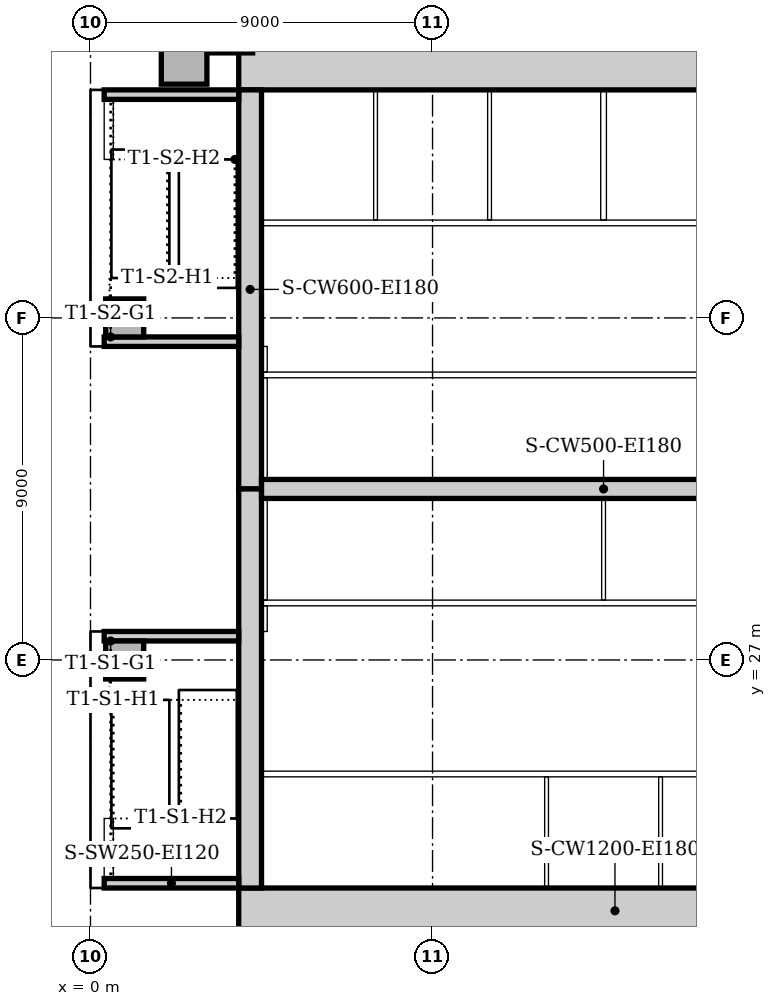
"""IFC4 building model, lengths in metres.
Left out: names, types, materials, properties, quantities, classifications, styles, units other than length and angle.
Written with IfcOpenShell. Run it as: python <this file> out.ifc"""

import sys

from ifc_helpers import new_model, si_unit, direction, frame, frame_2d, origin, origin_2d, place, context, subcontext, project, spatial, rectangle, extrude, element, fill, save


model = new_model("IFC4")
c1 = context("Model", 3, precision=1e-05, world=origin(), true_north=direction((0.0, 1.0)))
c2 = subcontext(c1, "Body", "Model", "MODEL_VIEW")
j1 = project(units=[si_unit("LENGTHUNIT", "METRE"), si_unit("PLANEANGLEUNIT", "RADIAN")], contexts=[c1])
p1 = place(None, origin())
s1 = spatial("IfcSite", under=j1, at=p1, CompositionType="ELEMENT")
p2 = place(p1, origin())
s2 = spatial("IfcBuilding", under=s1, at=p2, CompositionType="ELEMENT")
p3 = place(p2, frame((0.0, 0.0, -9.5)))
s3 = spatial("IfcBuildingStorey", under=s2, at=p3, CompositionType="ELEMENT", Elevation=-9.5)
for number, where, z_axis, x_axis in (
    (1, (3.9, 20.4, 0.0), (0.0, 0.0, 1.0), (1.0, 0.0, 0.0)),
    (2, (23.7, 42.6, 0.0), (0.0, 0.0, 1.0), (-1.0, 0.0, 0.0)),
):
    element("IfcWall", number, at=place(p3, frame(where, z_axis=z_axis, x_axis=x_axis)), inside=s3, PredefinedType="SOLIDWALL", context=c2, shape_type="SweptSolid", body=[
        extrude(rectangle(XDim=19.8, YDim=1.2, at=frame_2d((9.9, 0.0))), origin(), (0.0, 0.0, 1.0), 4.5),
    ])
p4 = place(p3, frame((4.2, 42.0, 0.0), z_axis=(0.0, 0.0, 1.0), x_axis=(0.0, -1.0, 0.0)))
e3 = element("IfcWall", 3, at=p4, inside=s3, PredefinedType="SOLIDWALL", context=c2, shape_type="SweptSolid", body=[
    extrude(rectangle(XDim=10.5, YDim=0.6, at=frame_2d((5.25, 0.0))), origin(), (0.0, 0.0, 1.0), 4.5),
])
p5 = place(p4, frame((5.3, 0.0, 0.0)))
e4 = element("IfcOpeningElement", 4, at=p5, cuts=e3, PredefinedType="OPENING", context=c2, shape_type="SweptSolid", body=[
    extrude(rectangle(XDim=1.0, YDim=2.1, at=frame_2d((0.5, 1.05))), frame((0.0, 0.31, 0.0), z_axis=(0.0, -1.0, 0.0), x_axis=(1.0, 0.0, 0.0)), (0.0, 0.0, 1.0), 0.62),
])
p6 = place(p3, frame((4.2, 31.5, 0.0), z_axis=(0.0, 0.0, 1.0), x_axis=(0.0, -1.0, 0.0)))
e5 = element("IfcWall", 5, at=p6, inside=s3, PredefinedType="SOLIDWALL", context=c2, shape_type="SweptSolid", body=[
    extrude(rectangle(XDim=10.5, YDim=0.6, at=frame_2d((5.25, 0.0))), origin(), (0.0, 0.0, 1.0), 4.5),
])
p7 = place(p6, frame((4.25, 0.0, 0.0)))
e6 = element("IfcOpeningElement", 6, at=p7, cuts=e5, PredefinedType="OPENING", context=c2, shape_type="SweptSolid", body=[
    extrude(rectangle(XDim=1.0, YDim=2.1, at=frame_2d((0.5, 1.05))), frame((0.0, 0.31, 0.0), z_axis=(0.0, -1.0, 0.0), x_axis=(1.0, 0.0, 0.0)), (0.0, 0.0, 1.0), 0.62),
])
p8 = place(p3, frame((4.5, 31.5, 0.0), z_axis=(0.0, 0.0, 1.0), x_axis=(1.0, 0.0, 0.0)))
e7 = element("IfcWall", 7, at=p8, inside=s3, PredefinedType="SOLIDWALL", context=c2, shape_type="SweptSolid", body=[
    extrude(rectangle(XDim=18.0, YDim=0.5, at=frame_2d((9.0, 0.0))), origin(), (0.0, 0.0, 1.0), 4.5),
])
p9 = place(p3, frame((0.36, 21.125, 0.0), z_axis=(0.0, 0.0, 1.0), x_axis=(1.0, 0.0, 0.0)))
e8 = element("IfcWall", 8, at=p9, inside=s3, PredefinedType="SOLIDWALL", context=c2, shape_type="SweptSolid", body=[
    extrude(rectangle(XDim=3.54, YDim=0.25, at=frame_2d((1.77, 0.0))), origin(), (0.0, 0.0, 1.0), 4.5),
])
p10 = place(p3, frame((3.9, 27.625, 0.0), z_axis=(0.0, 0.0, 1.0), x_axis=(-1.0, 0.0, 0.0)))
e9 = element("IfcWall", 9, at=p10, inside=s3, PredefinedType="SOLIDWALL", context=c2, shape_type="SweptSolid", body=[
    extrude(rectangle(XDim=3.54, YDim=0.25, at=frame_2d((1.77, 0.0))), origin(), (0.0, 0.0, 1.0), 4.5),
])
p11 = place(p10, frame((0.4, 0.0, 0.0)))
e10 = element("IfcOpeningElement", 10, at=p11, cuts=e9, PredefinedType="OPENING", context=c2, shape_type="SweptSolid", body=[
    extrude(rectangle(XDim=1.0, YDim=2.1, at=frame_2d((0.5, 1.05))), frame((0.0, 0.135, 0.0), z_axis=(0.0, -1.0, 0.0), x_axis=(1.0, 0.0, 0.0)), (0.0, 0.0, 1.0), 0.27),
])
p12 = place(p3, frame((0.36, 35.375, 0.0), z_axis=(0.0, 0.0, 1.0), x_axis=(1.0, 0.0, 0.0)))
e11 = element("IfcWall", 11, at=p12, inside=s3, PredefinedType="SOLIDWALL", context=c2, shape_type="SweptSolid", body=[
    extrude(rectangle(XDim=3.54, YDim=0.25, at=frame_2d((1.77, 0.0))), origin(), (0.0, 0.0, 1.0), 4.5),
])
p13 = place(p12, frame((2.14, 0.0, 0.0)))
e12 = element("IfcOpeningElement", 12, at=p13, cuts=e11, PredefinedType="OPENING", context=c2, shape_type="SweptSolid", body=[
    extrude(rectangle(XDim=1.0, YDim=2.1, at=frame_2d((0.5, 1.05))), frame((0.0, 0.135, 0.0), z_axis=(0.0, -1.0, 0.0), x_axis=(1.0, 0.0, 0.0)), (0.0, 0.0, 1.0), 0.27),
])
p14 = place(p3, frame((3.9, 41.875, 0.0), z_axis=(0.0, 0.0, 1.0), x_axis=(-1.0, 0.0, 0.0)))
e13 = element("IfcWall", 13, at=p14, inside=s3, PredefinedType="SOLIDWALL", context=c2, shape_type="SweptSolid", body=[
    extrude(rectangle(XDim=3.54, YDim=0.25, at=frame_2d((1.77, 0.0))), origin(), (0.0, 0.0, 1.0), 4.5),
])
for number, where, z_axis, x_axis in (
    (14, (3.667, 43.574, 0.0), (0.0, 0.0, 1.0), (1.0, 0.0, 0.0)),
    (15, (2.463, 42.75, 0.0), (0.0, 0.0, 1.0), (1.0, 0.0, 0.0)),
):
    element("IfcColumn", number, at=place(p3, frame(where, z_axis=z_axis, x_axis=x_axis)), inside=s3, PredefinedType="COLUMN", context=c2, shape_type="SweptSolid", body=[
        extrude(rectangle(XDim=1.2, YDim=1.2, at=origin_2d()), origin(), (0.0, 0.0, 1.0), 4.15),
    ])
for number, where, z_axis, x_axis in (
    (16, (0.9, 27.0, 0.0), (0.0, 0.0, 1.0), (1.0, 0.0, 0.0)),
    (17, (0.9, 36.0, 0.0), (0.0, 0.0, 1.0), (1.0, 0.0, 0.0)),
):
    element("IfcColumn", number, at=place(p3, frame(where, z_axis=z_axis, x_axis=x_axis)), inside=s3, PredefinedType="COLUMN", context=c2, shape_type="SweptSolid", body=[
        extrude(rectangle(XDim=1.0, YDim=1.0, at=origin_2d()), origin(), (0.0, 0.0, 1.0), 4.5),
    ])
for number, where, z_axis, x_axis in (
    (18, (0.48, 21.25, -4.5), (0.0, 0.0, 1.0), (0.0, 1.0, 0.0)),
    (19, (0.48, 40.17, -4.5), (0.0, 0.0, 1.0), (0.0, 1.0, 0.0)),
):
    element("IfcWall", number, at=place(p3, frame(where, z_axis=z_axis, x_axis=x_axis)), inside=s3, PredefinedType="STANDARD", context=c2, shape_type="SweptSolid", body=[
        extrude(rectangle(XDim=1.58, YDim=0.24, at=frame_2d((0.79, 0.0))), origin(), (0.0, 0.0, 1.0), 9.0),
    ])
p15 = place(p3, frame((4.5, 24.0, 0.0), z_axis=(0.0, 0.0, 1.0), x_axis=(1.0, 0.0, 0.0)))
e20 = element("IfcWall", 20, at=p15, inside=s3, PredefinedType="PARTITIONING", context=c2, shape_type="SweptSolid", body=[
    extrude(rectangle(XDim=18.0, YDim=0.15, at=frame_2d((9.0, 0.0))), origin(), (0.0, 0.0, 1.0), 4.15),
])
p16 = place(p15, frame((3.35, 0.0, 0.0)))
e21 = element("IfcOpeningElement", 21, at=p16, cuts=e20, PredefinedType="OPENING", context=c2, shape_type="SweptSolid", body=[
    extrude(rectangle(XDim=0.9, YDim=2.1, at=frame_2d((0.45, 1.05))), frame((0.0, 0.085, 0.0), z_axis=(0.0, -1.0, 0.0), x_axis=(1.0, 0.0, 0.0)), (0.0, 0.0, 1.0), 0.17),
])
p17 = place(p15, frame((8.55, 0.0, 0.0)))
e22 = element("IfcOpeningElement", 22, at=p17, cuts=e20, PredefinedType="OPENING", context=c2, shape_type="SweptSolid", body=[
    extrude(rectangle(XDim=0.9, YDim=2.1, at=frame_2d((0.45, 1.05))), frame((0.0, 0.085, 0.0), z_axis=(0.0, -1.0, 0.0), x_axis=(1.0, 0.0, 0.0)), (0.0, 0.0, 1.0), 0.17),
])
p18 = place(p15, frame((13.7, 0.0, 0.0)))
e23 = element("IfcOpeningElement", 23, at=p18, cuts=e20, PredefinedType="OPENING", context=c2, shape_type="SweptSolid", body=[
    extrude(rectangle(XDim=0.9, YDim=2.1, at=frame_2d((0.45, 1.05))), frame((0.0, 0.085, 0.0), z_axis=(0.0, -1.0, 0.0), x_axis=(1.0, 0.0, 0.0)), (0.0, 0.0, 1.0), 0.17),
])
p19 = place(p3, frame((4.5, 28.5, 0.0), z_axis=(0.0, 0.0, 1.0), x_axis=(1.0, 0.0, 0.0)))
e24 = element("IfcWall", 24, at=p19, inside=s3, PredefinedType="PARTITIONING", context=c2, shape_type="SweptSolid", body=[
    extrude(rectangle(XDim=18.0, YDim=0.15, at=frame_2d((9.0, 0.0))), origin(), (0.0, 0.0, 1.0), 4.15),
])
p20 = place(p19, frame((4.1, 0.0, 0.0)))
e25 = element("IfcOpeningElement", 25, at=p20, cuts=e24, PredefinedType="OPENING", context=c2, shape_type="SweptSolid", body=[
    extrude(rectangle(XDim=0.9, YDim=2.1, at=frame_2d((0.45, 1.05))), frame((0.0, 0.085, 0.0), z_axis=(0.0, -1.0, 0.0), x_axis=(1.0, 0.0, 0.0)), (0.0, 0.0, 1.0), 0.17),
])
p21 = place(p19, frame((10.8, 0.0, 0.0)))
e26 = element("IfcOpeningElement", 26, at=p21, cuts=e24, PredefinedType="OPENING", context=c2, shape_type="SweptSolid", body=[
    extrude(rectangle(XDim=0.9, YDim=2.1, at=frame_2d((0.45, 1.05))), frame((0.0, 0.085, 0.0), z_axis=(0.0, -1.0, 0.0), x_axis=(1.0, 0.0, 0.0)), (0.0, 0.0, 1.0), 0.17),
])
p22 = place(p19, frame((15.2, 0.0, 0.0)))
e27 = element("IfcOpeningElement", 27, at=p22, cuts=e24, PredefinedType="OPENING", context=c2, shape_type="SweptSolid", body=[
    extrude(rectangle(XDim=0.9, YDim=2.1, at=frame_2d((0.45, 1.05))), frame((0.0, 0.085, 0.0), z_axis=(0.0, -1.0, 0.0), x_axis=(1.0, 0.0, 0.0)), (0.0, 0.0, 1.0), 0.17),
])
p23 = place(p3, frame((4.5, 34.5, 0.0), z_axis=(0.0, 0.0, 1.0), x_axis=(1.0, 0.0, 0.0)))
e28 = element("IfcWall", 28, at=p23, inside=s3, PredefinedType="PARTITIONING", context=c2, shape_type="SweptSolid", body=[
    extrude(rectangle(XDim=11.9, YDim=0.15, at=frame_2d((5.95, 0.0))), origin(), (0.0, 0.0, 1.0), 4.15),
])
p24 = place(p23, frame((5.5, 0.0, 0.0)))
e29 = element("IfcOpeningElement", 29, at=p24, cuts=e28, PredefinedType="OPENING", context=c2, shape_type="SweptSolid", body=[
    extrude(rectangle(XDim=0.9, YDim=2.1, at=frame_2d((0.45, 1.05))), frame((0.0, 0.085, 0.0), z_axis=(0.0, -1.0, 0.0), x_axis=(1.0, 0.0, 0.0)), (0.0, 0.0, 1.0), 0.17),
])
p25 = place(p3, frame((4.5, 38.5, 0.0), z_axis=(0.0, 0.0, 1.0), x_axis=(1.0, 0.0, 0.0)))
e30 = element("IfcWall", 30, at=p25, inside=s3, PredefinedType="PARTITIONING", context=c2, shape_type="SweptSolid", body=[
    extrude(rectangle(XDim=11.9, YDim=0.15, at=frame_2d((5.95, 0.0))), origin(), (0.0, 0.0, 1.0), 4.15),
])
p26 = place(p25, frame((1.1, 0.0, 0.0)))
e31 = element("IfcOpeningElement", 31, at=p26, cuts=e30, PredefinedType="OPENING", context=c2, shape_type="SweptSolid", body=[
    extrude(rectangle(XDim=0.9, YDim=2.1, at=frame_2d((0.45, 1.05))), frame((0.0, 0.085, 0.0), z_axis=(0.0, -1.0, 0.0), x_axis=(1.0, 0.0, 0.0)), (0.0, 0.0, 1.0), 0.17),
])
p27 = place(p25, frame((4.05, 0.0, 0.0)))
e32 = element("IfcOpeningElement", 32, at=p27, cuts=e30, PredefinedType="OPENING", context=c2, shape_type="SweptSolid", body=[
    extrude(rectangle(XDim=0.9, YDim=2.1, at=frame_2d((0.45, 1.05))), frame((0.0, 0.085, 0.0), z_axis=(0.0, -1.0, 0.0), x_axis=(1.0, 0.0, 0.0)), (0.0, 0.0, 1.0), 0.17),
])
p28 = place(p25, frame((7.05, 0.0, 0.0)))
e33 = element("IfcOpeningElement", 33, at=p28, cuts=e30, PredefinedType="OPENING", context=c2, shape_type="SweptSolid", body=[
    extrude(rectangle(XDim=0.9, YDim=2.1, at=frame_2d((0.45, 1.05))), frame((0.0, 0.085, 0.0), z_axis=(0.0, -1.0, 0.0), x_axis=(1.0, 0.0, 0.0)), (0.0, 0.0, 1.0), 0.17),
])
p29 = place(p25, frame((9.95, 0.0, 0.0)))
e34 = element("IfcOpeningElement", 34, at=p29, cuts=e30, PredefinedType="OPENING", context=c2, shape_type="SweptSolid", body=[
    extrude(rectangle(XDim=0.8, YDim=2.1, at=frame_2d((0.4, 1.05))), frame((0.0, 0.085, 0.0), z_axis=(0.0, -1.0, 0.0), x_axis=(1.0, 0.0, 0.0)), (0.0, 0.0, 1.0), 0.17),
])
p30 = place(p3, frame((4.575, 34.575, 0.0), z_axis=(0.0, 0.0, 1.0), x_axis=(0.0, 1.0, 0.0)))
e35 = element("IfcWall", 35, at=p30, inside=s3, PredefinedType="PARTITIONING", context=c2, shape_type="SweptSolid", body=[
    extrude(rectangle(XDim=0.675, YDim=0.15, at=frame_2d((0.338, 0.0))), origin(), (0.0, 0.0, 1.0), 4.15),
])
p31 = place(p3, frame((4.575, 31.75, 0.0), z_axis=(0.0, 0.0, 1.0), x_axis=(0.0, 1.0, 0.0)))
e36 = element("IfcWall", 36, at=p31, inside=s3, PredefinedType="PARTITIONING", context=c2, shape_type="SweptSolid", body=[
    extrude(rectangle(XDim=2.675, YDim=0.15, at=frame_2d((1.337, 0.0))), origin(), (0.0, 0.0, 1.0), 4.15),
])
p32 = place(p3, frame((4.575, 27.75, 0.0), z_axis=(0.0, 0.0, 1.0), x_axis=(0.0, 1.0, 0.0)))
e37 = element("IfcWall", 37, at=p32, inside=s3, PredefinedType="PARTITIONING", context=c2, shape_type="SweptSolid", body=[
    extrude(rectangle(XDim=0.675, YDim=0.15, at=frame_2d((0.338, 0.0))), origin(), (0.0, 0.0, 1.0), 4.15),
])
p33 = place(p3, frame((4.575, 28.575, 0.0), z_axis=(0.0, 0.0, 1.0), x_axis=(0.0, 1.0, 0.0)))
e38 = element("IfcWall", 38, at=p33, inside=s3, PredefinedType="PARTITIONING", context=c2, shape_type="SweptSolid", body=[
    extrude(rectangle(XDim=2.675, YDim=0.15, at=frame_2d((1.337, 0.0))), origin(), (0.0, 0.0, 1.0), 4.15),
])
p34 = place(p3, frame((13.5, 38.575, 0.0), z_axis=(0.0, 0.0, 1.0), x_axis=(0.0, 1.0, 0.0)))
e39 = element("IfcWall", 39, at=p34, inside=s3, PredefinedType="PARTITIONING", context=c2, shape_type="SweptSolid", body=[
    extrude(rectangle(XDim=3.425, YDim=0.15, at=frame_2d((1.712, 0.0))), origin(), (0.0, 0.0, 1.0), 4.15),
])
for number, where, z_axis, x_axis in (
    (40, (7.5, 38.575, 0.0), (0.0, 0.0, 1.0), (0.0, 1.0, 0.0)),
    (41, (10.5, 38.575, 0.0), (0.0, 0.0, 1.0), (0.0, 1.0, 0.0)),
):
    element("IfcWall", number, at=place(p3, frame(where, z_axis=z_axis, x_axis=x_axis)), inside=s3, PredefinedType="PARTITIONING", context=c2, shape_type="SweptSolid", body=[
        extrude(rectangle(XDim=3.425, YDim=0.1, at=frame_2d((1.712, 0.0))), origin(), (0.0, 0.0, 1.0), 4.15),
    ])
p35 = place(p3, frame((12.0, 21.0, 0.0), z_axis=(0.0, 0.0, 1.0), x_axis=(0.0, 1.0, 0.0)))
e42 = element("IfcWall", 42, at=p35, inside=s3, PredefinedType="PARTITIONING", context=c2, shape_type="SweptSolid", body=[
    extrude(rectangle(XDim=2.925, YDim=0.1, at=frame_2d((1.462, 0.0))), origin(), (0.0, 0.0, 1.0), 4.15),
])
p36 = place(p3, frame((13.5, 28.575, 0.0), z_axis=(0.0, 0.0, 1.0), x_axis=(0.0, 1.0, 0.0)))
e43 = element("IfcWall", 43, at=p36, inside=s3, PredefinedType="PARTITIONING", context=c2, shape_type="SweptSolid", body=[
    extrude(rectangle(XDim=2.675, YDim=0.1, at=frame_2d((1.337, 0.0))), origin(), (0.0, 0.0, 1.0), 4.15),
])
p37 = place(p3, frame((15.0, 21.0, 0.0), z_axis=(0.0, 0.0, 1.0), x_axis=(0.0, 1.0, 0.0)))
e44 = element("IfcWall", 44, at=p37, inside=s3, PredefinedType="PARTITIONING", context=c2, shape_type="SweptSolid", body=[
    extrude(rectangle(XDim=2.925, YDim=0.1, at=frame_2d((1.462, 0.0))), origin(), (0.0, 0.0, 1.0), 4.15),
])
p38 = place(p7, frame((1.0, 0.0, 0.0), z_axis=(0.0, 0.0, 1.0), x_axis=(-1.0, 0.0, 0.0)))
e45 = element("IfcDoor", 45, at=p38, inside=s3, OperationType="SINGLE_SWING_RIGHT", PredefinedType="DOOR", context=c2, shape_type="SweptSolid", body=[
    extrude(rectangle(XDim=1.0, YDim=2.1, at=frame_2d((0.5, 1.05))), frame((0.0, 0.025, 0.0), z_axis=(0.0, -1.0, 0.0), x_axis=(1.0, 0.0, 0.0)), (0.0, 0.0, 1.0), 0.05),
])
fill(e6, e45)
p39 = place(p11, origin())
e46 = element("IfcDoor", 46, at=p39, inside=s3, OperationType="SINGLE_SWING_LEFT", PredefinedType="DOOR", context=c2, shape_type="SweptSolid", body=[
    extrude(rectangle(XDim=1.0, YDim=2.1, at=frame_2d((0.5, 1.05))), frame((0.0, 0.025, 0.0), z_axis=(0.0, -1.0, 0.0), x_axis=(1.0, 0.0, 0.0)), (0.0, 0.0, 1.0), 0.05),
])
fill(e10, e46)
p40 = place(p5, frame((1.0, 0.0, 0.0), z_axis=(0.0, 0.0, 1.0), x_axis=(-1.0, 0.0, 0.0)))
e47 = element("IfcDoor", 47, at=p40, inside=s3, OperationType="SINGLE_SWING_LEFT", PredefinedType="DOOR", context=c2, shape_type="SweptSolid", body=[
    extrude(rectangle(XDim=1.0, YDim=2.1, at=frame_2d((0.5, 1.05))), frame((0.0, 0.025, 0.0), z_axis=(0.0, -1.0, 0.0), x_axis=(1.0, 0.0, 0.0)), (0.0, 0.0, 1.0), 0.05),
])
fill(e4, e47)
p41 = place(p13, origin())
e48 = element("IfcDoor", 48, at=p41, inside=s3, OperationType="SINGLE_SWING_RIGHT", PredefinedType="DOOR", context=c2, shape_type="SweptSolid", body=[
    extrude(rectangle(XDim=1.0, YDim=2.1, at=frame_2d((0.5, 1.05))), frame((0.0, 0.025, 0.0), z_axis=(0.0, -1.0, 0.0), x_axis=(1.0, 0.0, 0.0)), (0.0, 0.0, 1.0), 0.05),
])
fill(e12, e48)
p42 = place(p16, frame((0.9, 0.0, 0.0), z_axis=(0.0, 0.0, 1.0), x_axis=(-1.0, 0.0, 0.0)))
e49 = element("IfcDoor", 49, at=p42, inside=s3, OperationType="SINGLE_SWING_LEFT", PredefinedType="DOOR", context=c2, shape_type="SweptSolid", body=[
    extrude(rectangle(XDim=0.9, YDim=2.1, at=frame_2d((0.45, 1.05))), frame((0.0, 0.025, 0.0), z_axis=(0.0, -1.0, 0.0), x_axis=(1.0, 0.0, 0.0)), (0.0, 0.0, 1.0), 0.05),
])
fill(e21, e49)
p43 = place(p17, frame((0.9, 0.0, 0.0), z_axis=(0.0, 0.0, 1.0), x_axis=(-1.0, 0.0, 0.0)))
e50 = element("IfcDoor", 50, at=p43, inside=s3, OperationType="SINGLE_SWING_LEFT", PredefinedType="DOOR", context=c2, shape_type="SweptSolid", body=[
    extrude(rectangle(XDim=0.9, YDim=2.1, at=frame_2d((0.45, 1.05))), frame((0.0, 0.025, 0.0), z_axis=(0.0, -1.0, 0.0), x_axis=(1.0, 0.0, 0.0)), (0.0, 0.0, 1.0), 0.05),
])
fill(e22, e50)
p44 = place(p20, origin())
e51 = element("IfcDoor", 51, at=p44, inside=s3, OperationType="SINGLE_SWING_RIGHT", PredefinedType="DOOR", context=c2, shape_type="SweptSolid", body=[
    extrude(rectangle(XDim=0.9, YDim=2.1, at=frame_2d((0.45, 1.05))), frame((0.0, 0.025, 0.0), z_axis=(0.0, -1.0, 0.0), x_axis=(1.0, 0.0, 0.0)), (0.0, 0.0, 1.0), 0.05),
])
fill(e25, e51)
p45 = place(p21, origin())
e52 = element("IfcDoor", 52, at=p45, inside=s3, OperationType="SINGLE_SWING_RIGHT", PredefinedType="DOOR", context=c2, shape_type="SweptSolid", body=[
    extrude(rectangle(XDim=0.9, YDim=2.1, at=frame_2d((0.45, 1.05))), frame((0.0, 0.025, 0.0), z_axis=(0.0, -1.0, 0.0), x_axis=(1.0, 0.0, 0.0)), (0.0, 0.0, 1.0), 0.05),
])
fill(e26, e52)
p46 = place(p24, frame((0.9, 0.0, 0.0), z_axis=(0.0, 0.0, 1.0), x_axis=(-1.0, 0.0, 0.0)))
e53 = element("IfcDoor", 53, at=p46, inside=s3, OperationType="SINGLE_SWING_RIGHT", PredefinedType="DOOR", context=c2, shape_type="SweptSolid", body=[
    extrude(rectangle(XDim=0.9, YDim=2.1, at=frame_2d((0.45, 1.05))), frame((0.0, 0.025, 0.0), z_axis=(0.0, -1.0, 0.0), x_axis=(1.0, 0.0, 0.0)), (0.0, 0.0, 1.0), 0.05),
])
fill(e29, e53)
p47 = place(p26, origin())
e54 = element("IfcDoor", 54, at=p47, inside=s3, OperationType="SINGLE_SWING_RIGHT", PredefinedType="DOOR", context=c2, shape_type="SweptSolid", body=[
    extrude(rectangle(XDim=0.9, YDim=2.1, at=frame_2d((0.45, 1.05))), frame((0.0, 0.025, 0.0), z_axis=(0.0, -1.0, 0.0), x_axis=(1.0, 0.0, 0.0)), (0.0, 0.0, 1.0), 0.05),
])
fill(e31, e54)
p48 = place(p27, origin())
e55 = element("IfcDoor", 55, at=p48, inside=s3, OperationType="SINGLE_SWING_LEFT", PredefinedType="DOOR", context=c2, shape_type="SweptSolid", body=[
    extrude(rectangle(XDim=0.9, YDim=2.1, at=frame_2d((0.45, 1.05))), frame((0.0, 0.025, 0.0), z_axis=(0.0, -1.0, 0.0), x_axis=(1.0, 0.0, 0.0)), (0.0, 0.0, 1.0), 0.05),
])
fill(e32, e55)
p49 = place(p28, origin())
e56 = element("IfcDoor", 56, at=p49, inside=s3, OperationType="SINGLE_SWING_RIGHT", PredefinedType="DOOR", context=c2, shape_type="SweptSolid", body=[
    extrude(rectangle(XDim=0.9, YDim=2.1, at=frame_2d((0.45, 1.05))), frame((0.0, 0.025, 0.0), z_axis=(0.0, -1.0, 0.0), x_axis=(1.0, 0.0, 0.0)), (0.0, 0.0, 1.0), 0.05),
])
fill(e33, e56)
p50 = place(p29, origin())
e57 = element("IfcDoor", 57, at=p50, inside=s3, OperationType="SINGLE_SWING_LEFT", PredefinedType="DOOR", context=c2, shape_type="SweptSolid", body=[
    extrude(rectangle(XDim=0.8, YDim=2.1, at=frame_2d((0.4, 1.05))), frame((0.0, 0.025, 0.0), z_axis=(0.0, -1.0, 0.0), x_axis=(1.0, 0.0, 0.0)), (0.0, 0.0, 1.0), 0.05),
])
fill(e34, e57)
save(model, sys.argv[1])
